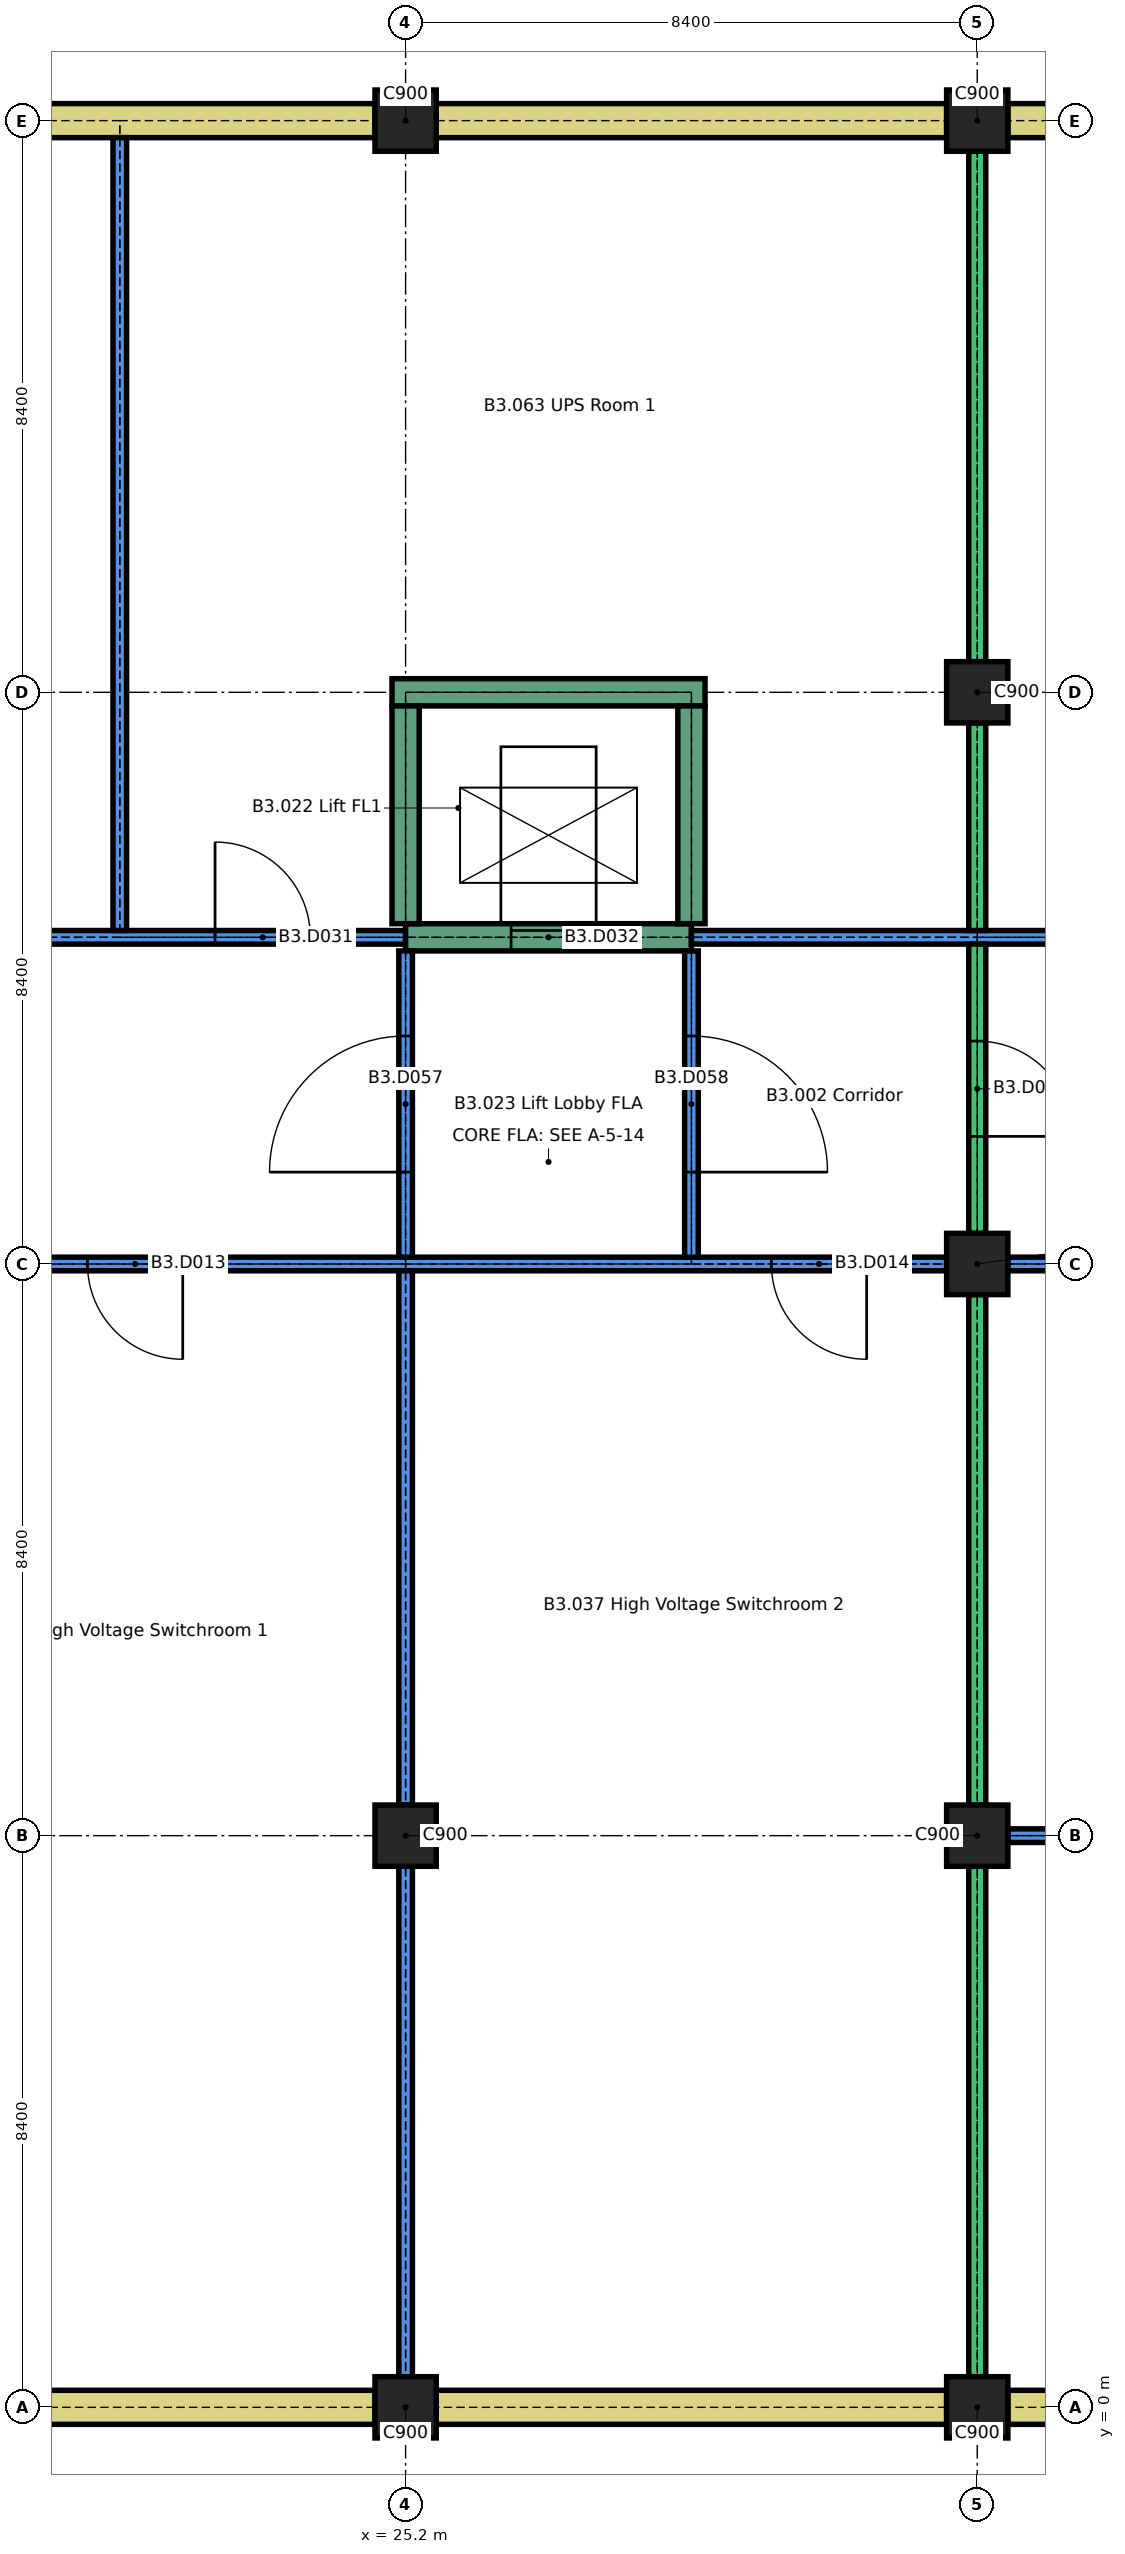
"""IFC4 building model, lengths in metres.
Left out: names, types, materials, properties, quantities, classifications, styles, units other than length and angle.
Written with IfcOpenShell. Run it as: python <this file> out.ifc"""

import sys

from ifc_helpers import new_model, si_unit, direction, frame, frame_2d, origin, origin_2d, place, context, subcontext, project, spatial, rectangle, extrude, element, fill, save


model = new_model("IFC4")
c1 = context("Model", 3, precision=1e-05, world=origin(), true_north=direction((0.0, 1.0)))
c2 = subcontext(c1, "Body", "Model", "MODEL_VIEW")
j1 = project(units=[si_unit("LENGTHUNIT", "METRE"), si_unit("PLANEANGLEUNIT", "RADIAN")], contexts=[c1])
p1 = place(None, origin())
s1 = spatial("IfcSite", under=j1, at=p1, CompositionType="ELEMENT")
p2 = place(p1, origin())
s2 = spatial("IfcBuilding", under=s1, at=p2, CompositionType="ELEMENT")
p3 = place(p2, frame((0.0, 0.0, -11.4)))
s3 = spatial("IfcBuildingStorey", under=s2, at=p3, CompositionType="ELEMENT", Elevation=-11.4)
for number, where, z_axis, x_axis in (
    (1, (25.2, 0.0, 0.0), (0.0, 0.0, 1.0), (1.0, 0.0, 0.0)),
    (2, (33.6, 0.0, 0.0), (0.0, 0.0, 1.0), (1.0, 0.0, 0.0)),
    (3, (25.2, 8.4, 0.0), (0.0, 0.0, 1.0), (1.0, 0.0, 0.0)),
    (4, (33.6, 8.4, 0.0), (0.0, 0.0, 1.0), (1.0, 0.0, 0.0)),
    (5, (33.6, 16.8, 0.0), (0.0, 0.0, 1.0), (1.0, 0.0, 0.0)),
    (6, (33.6, 25.2, 0.0), (0.0, 0.0, 1.0), (1.0, 0.0, 0.0)),
    (7, (25.2, 33.6, 0.0), (0.0, 0.0, 1.0), (1.0, 0.0, 0.0)),
    (8, (33.6, 33.6, 0.0), (0.0, 0.0, 1.0), (1.0, 0.0, 0.0)),
):
    element("IfcColumn", number, at=place(p3, frame(where, z_axis=z_axis, x_axis=x_axis)), inside=s3, PredefinedType="COLUMN", context=c2, shape_type="SweptSolid", body=[
        extrude(rectangle(XDim=0.9, YDim=0.9, at=origin_2d()), origin(), (0.0, 0.0, 1.0), 3.2),
    ])
for number, where, z_axis, x_axis in (
    (9, (17.25, 0.0, 0.0), (0.0, 0.0, 1.0), (1.0, 0.0, 0.0)),
    (10, (25.65, 0.0, 0.0), (0.0, 0.0, 1.0), (1.0, 0.0, 0.0)),
    (11, (34.05, 0.0, 0.0), (0.0, 0.0, 1.0), (1.0, 0.0, 0.0)),
    (12, (17.25, 33.6, 0.0), (0.0, 0.0, 1.0), (1.0, 0.0, 0.0)),
    (13, (25.65, 33.6, 0.0), (0.0, 0.0, 1.0), (1.0, 0.0, 0.0)),
    (14, (34.05, 33.6, 0.0), (0.0, 0.0, 1.0), (1.0, 0.0, 0.0)),
):
    element("IfcWall", number, at=place(p3, frame(where, z_axis=z_axis, x_axis=x_axis)), inside=s3, PredefinedType="SOLIDWALL", context=c2, shape_type="SweptSolid", body=[
        extrude(rectangle(XDim=7.5, YDim=0.5, at=frame_2d((3.75, 0.0))), origin(), (0.0, 0.0, 1.0), 3.2),
    ])
p4 = place(p3, frame((34.05, 8.4, 0.0), z_axis=(0.0, 0.0, 1.0), x_axis=(1.0, 0.0, 0.0)))
e15 = element("IfcWall", 15, at=p4, inside=s3, PredefinedType="PARTITIONING", context=c2, shape_type="SweptSolid", body=[
    extrude(rectangle(XDim=7.5, YDim=0.2, at=frame_2d((3.75, 0.0))), origin(), (0.0, 0.0, 1.0), 3.2),
])
p5 = place(p4, frame((3.05, 0.0, 0.0)))
e16 = element("IfcOpeningElement", 16, at=p5, cuts=e15, PredefinedType="OPENING", context=c2, shape_type="SweptSolid", body=[
    extrude(rectangle(XDim=1.4, YDim=2.1, at=frame_2d((0.7, 1.05))), frame((0.0, 0.11, 0.0), z_axis=(0.0, -1.0, 0.0), x_axis=(1.0, 0.0, 0.0)), (0.0, 0.0, 1.0), 0.22),
])
p6 = place(p3, frame((17.25, 16.8, 0.0), z_axis=(0.0, 0.0, 1.0), x_axis=(1.0, 0.0, 0.0)))
e17 = element("IfcWall", 17, at=p6, inside=s3, PredefinedType="PARTITIONING", context=c2, shape_type="SweptSolid", body=[
    extrude(rectangle(XDim=15.9, YDim=0.2, at=frame_2d((7.95, 0.0))), origin(), (0.0, 0.0, 1.0), 3.2),
])
p7 = place(p6, frame((3.275, 0.0, 0.0)))
e18 = element("IfcOpeningElement", 18, at=p7, cuts=e17, PredefinedType="OPENING", context=c2, shape_type="SweptSolid", body=[
    extrude(rectangle(XDim=1.4, YDim=2.1, at=frame_2d((0.7, 1.05))), frame((0.0, 0.11, 0.0), z_axis=(0.0, -1.0, 0.0), x_axis=(1.0, 0.0, 0.0)), (0.0, 0.0, 1.0), 0.22),
])
p8 = place(p6, frame((13.325, 0.0, 0.0)))
e19 = element("IfcOpeningElement", 19, at=p8, cuts=e17, PredefinedType="OPENING", context=c2, shape_type="SweptSolid", body=[
    extrude(rectangle(XDim=1.4, YDim=2.1, at=frame_2d((0.7, 1.05))), frame((0.0, 0.11, 0.0), z_axis=(0.0, -1.0, 0.0), x_axis=(1.0, 0.0, 0.0)), (0.0, 0.0, 1.0), 0.22),
])
p9 = place(p3, frame((34.05, 16.8, 0.0), z_axis=(0.0, 0.0, 1.0), x_axis=(1.0, 0.0, 0.0)))
e20 = element("IfcWall", 20, at=p9, inside=s3, PredefinedType="PARTITIONING", context=c2, shape_type="SweptSolid", body=[
    extrude(rectangle(XDim=7.5, YDim=0.2, at=frame_2d((3.75, 0.0))), origin(), (0.0, 0.0, 1.0), 3.2),
])
p10 = place(p9, frame((3.05, 0.0, 0.0)))
e21 = element("IfcOpeningElement", 21, at=p10, cuts=e20, PredefinedType="OPENING", context=c2, shape_type="SweptSolid", body=[
    extrude(rectangle(XDim=1.4, YDim=2.1, at=frame_2d((0.7, 1.05))), frame((0.0, 0.11, 0.0), z_axis=(0.0, -1.0, 0.0), x_axis=(1.0, 0.0, 0.0)), (0.0, 0.0, 1.0), 0.22),
])
p11 = place(p3, frame((8.3, 21.6, 0.0), z_axis=(0.0, 0.0, 1.0), x_axis=(1.0, 0.0, 0.0)))
e22 = element("IfcWall", 22, at=p11, inside=s3, PredefinedType="PARTITIONING", context=c2, shape_type="SweptSolid", body=[
    extrude(rectangle(XDim=16.9, YDim=0.2, at=frame_2d((8.45, 0.0))), origin(), (0.0, 0.0, 1.0), 3.2),
])
p12 = place(p11, frame((5.7, 0.0, 0.0)))
e23 = element("IfcOpeningElement", 23, at=p12, cuts=e22, PredefinedType="OPENING", context=c2, shape_type="SweptSolid", body=[
    extrude(rectangle(XDim=1.4, YDim=2.1, at=frame_2d((0.7, 1.05))), frame((0.0, 0.11, 0.0), z_axis=(0.0, -1.0, 0.0), x_axis=(1.0, 0.0, 0.0)), (0.0, 0.0, 1.0), 0.22),
])
p13 = place(p11, frame((14.1, 0.0, 0.0)))
e24 = element("IfcOpeningElement", 24, at=p13, cuts=e22, PredefinedType="OPENING", context=c2, shape_type="SweptSolid", body=[
    extrude(rectangle(XDim=1.4, YDim=2.1, at=frame_2d((0.7, 1.05))), frame((0.0, 0.11, 0.0), z_axis=(0.0, -1.0, 0.0), x_axis=(1.0, 0.0, 0.0)), (0.0, 0.0, 1.0), 0.22),
])
p14 = place(p3, frame((25.2, 21.6, 0.0), z_axis=(0.0, 0.0, 1.0), x_axis=(1.0, 0.0, 0.0)))
e25 = element("IfcWall", 25, at=p14, inside=s3, PredefinedType="SHEAR", context=c2, shape_type="SweptSolid", body=[
    extrude(rectangle(XDim=4.2, YDim=0.4, at=frame_2d((2.1, 0.0))), origin(), (0.0, 0.0, 1.0), 3.2),
])
p15 = place(p14, frame((1.55, 0.0, 0.0)))
e26 = element("IfcOpeningElement", 26, at=p15, cuts=e25, PredefinedType="OPENING", context=c2, shape_type="SweptSolid", body=[
    extrude(rectangle(XDim=1.1, YDim=2.1, at=frame_2d((0.55, 1.05))), frame((0.0, 0.21, 0.0), z_axis=(0.0, -1.0, 0.0), x_axis=(1.0, 0.0, 0.0)), (0.0, 0.0, 1.0), 0.42),
])
p16 = place(p3, frame((29.4, 21.6, 0.0), z_axis=(0.0, 0.0, 1.0), x_axis=(1.0, 0.0, 0.0)))
e27 = element("IfcWall", 27, at=p16, inside=s3, PredefinedType="PARTITIONING", context=c2, shape_type="SweptSolid", body=[
    extrude(rectangle(XDim=21.1, YDim=0.2, at=frame_2d((10.55, 0.0))), origin(), (0.0, 0.0, 1.0), 3.2),
])
p17 = place(p16, frame((11.9, 0.0, 0.0)))
e28 = element("IfcOpeningElement", 28, at=p17, cuts=e27, PredefinedType="OPENING", context=c2, shape_type="SweptSolid", body=[
    extrude(rectangle(XDim=1.4, YDim=2.1, at=frame_2d((0.7, 1.05))), frame((0.0, 0.11, 0.0), z_axis=(0.0, -1.0, 0.0), x_axis=(1.0, 0.0, 0.0)), (0.0, 0.0, 1.0), 0.22),
])
p18 = place(p3, frame((25.0, 25.2, 0.0), z_axis=(0.0, 0.0, 1.0), x_axis=(1.0, 0.0, 0.0)))
e29 = element("IfcWall", 29, at=p18, inside=s3, PredefinedType="SHEAR", context=c2, shape_type="SweptSolid", body=[
    extrude(rectangle(XDim=4.6, YDim=0.4, at=frame_2d((2.3, 0.0))), origin(), (0.0, 0.0, 1.0), 3.2),
])
p19 = place(p3, frame((21.0, 21.7, 0.0), z_axis=(0.0, 0.0, 1.0), x_axis=(0.0, 1.0, 0.0)))
e30 = element("IfcWall", 30, at=p19, inside=s3, PredefinedType="PARTITIONING", context=c2, shape_type="SweptSolid", body=[
    extrude(rectangle(XDim=11.65, YDim=0.2, at=frame_2d((5.825, 0.0))), origin(), (0.0, 0.0, 1.0), 3.2),
])
p20 = place(p3, frame((25.2, 0.45, 0.0), z_axis=(0.0, 0.0, 1.0), x_axis=(0.0, 1.0, 0.0)))
e31 = element("IfcWall", 31, at=p20, inside=s3, PredefinedType="PARTITIONING", context=c2, shape_type="SweptSolid", body=[
    extrude(rectangle(XDim=7.5, YDim=0.2, at=frame_2d((3.75, 0.0))), origin(), (0.0, 0.0, 1.0), 3.2),
])
p21 = place(p3, frame((25.2, 8.85, 0.0), z_axis=(0.0, 0.0, 1.0), x_axis=(0.0, 1.0, 0.0)))
e32 = element("IfcWall", 32, at=p21, inside=s3, PredefinedType="PARTITIONING", context=c2, shape_type="SweptSolid", body=[
    extrude(rectangle(XDim=7.85, YDim=0.2, at=frame_2d((3.925, 0.0))), origin(), (0.0, 0.0, 1.0), 3.2),
])
p22 = place(p3, frame((25.2, 16.9, 0.0), z_axis=(0.0, 0.0, 1.0), x_axis=(0.0, 1.0, 0.0)))
e33 = element("IfcWall", 33, at=p22, inside=s3, PredefinedType="PARTITIONING", context=c2, shape_type="SweptSolid", body=[
    extrude(rectangle(XDim=4.5, YDim=0.2, at=frame_2d((2.25, 0.0))), origin(), (0.0, 0.0, 1.0), 3.2),
])
p23 = place(p22, frame((1.25, 0.0, 0.0)))
e34 = element("IfcOpeningElement", 34, at=p23, cuts=e33, PredefinedType="OPENING", context=c2, shape_type="SweptSolid", body=[
    extrude(rectangle(XDim=2.0, YDim=2.4, at=frame_2d((1.0, 1.2))), frame((0.0, 0.11, 0.0), z_axis=(0.0, -1.0, 0.0), x_axis=(1.0, 0.0, 0.0)), (0.0, 0.0, 1.0), 0.22),
])
p24 = place(p3, frame((25.2, 21.8, 0.0), z_axis=(0.0, 0.0, 1.0), x_axis=(0.0, 1.0, 0.0)))
e35 = element("IfcWall", 35, at=p24, inside=s3, PredefinedType="SHEAR", context=c2, shape_type="SweptSolid", body=[
    extrude(rectangle(XDim=3.2, YDim=0.4, at=frame_2d((1.6, 0.0))), origin(), (0.0, 0.0, 1.0), 3.2),
])
p25 = place(p3, frame((29.4, 16.9, 0.0), z_axis=(0.0, 0.0, 1.0), x_axis=(0.0, 1.0, 0.0)))
e36 = element("IfcWall", 36, at=p25, inside=s3, PredefinedType="PARTITIONING", context=c2, shape_type="SweptSolid", body=[
    extrude(rectangle(XDim=4.5, YDim=0.2, at=frame_2d((2.25, 0.0))), origin(), (0.0, 0.0, 1.0), 3.2),
])
p26 = place(p25, frame((1.25, 0.0, 0.0)))
e37 = element("IfcOpeningElement", 37, at=p26, cuts=e36, PredefinedType="OPENING", context=c2, shape_type="SweptSolid", body=[
    extrude(rectangle(XDim=2.0, YDim=2.4, at=frame_2d((1.0, 1.2))), frame((0.0, 0.11, 0.0), z_axis=(0.0, -1.0, 0.0), x_axis=(1.0, 0.0, 0.0)), (0.0, 0.0, 1.0), 0.22),
])
p27 = place(p3, frame((29.4, 21.8, 0.0), z_axis=(0.0, 0.0, 1.0), x_axis=(0.0, 1.0, 0.0)))
e38 = element("IfcWall", 38, at=p27, inside=s3, PredefinedType="SHEAR", context=c2, shape_type="SweptSolid", body=[
    extrude(rectangle(XDim=3.2, YDim=0.4, at=frame_2d((1.6, 0.0))), origin(), (0.0, 0.0, 1.0), 3.2),
])
for number, where, z_axis, x_axis in (
    (39, (33.6, 0.45, 0.0), (0.0, 0.0, 1.0), (0.0, 1.0, 0.0)),
    (40, (33.6, 8.85, 0.0), (0.0, 0.0, 1.0), (0.0, 1.0, 0.0)),
):
    element("IfcWall", number, at=place(p3, frame(where, z_axis=z_axis, x_axis=x_axis)), inside=s3, PredefinedType="SOLIDWALL", context=c2, shape_type="SweptSolid", body=[
        extrude(rectangle(XDim=7.5, YDim=0.25, at=frame_2d((3.75, 0.0))), origin(), (0.0, 0.0, 1.0), 3.2),
    ])
p28 = place(p3, frame((33.6, 17.25, 0.0), z_axis=(0.0, 0.0, 1.0), x_axis=(0.0, 1.0, 0.0)))
e41 = element("IfcWall", 41, at=p28, inside=s3, PredefinedType="SOLIDWALL", context=c2, shape_type="SweptSolid", body=[
    extrude(rectangle(XDim=4.25, YDim=0.25, at=frame_2d((2.125, 0.0))), origin(), (0.0, 0.0, 1.0), 3.2),
])
p29 = place(p28, frame((1.425, 0.0, 0.0)))
e42 = element("IfcOpeningElement", 42, at=p29, cuts=e41, PredefinedType="OPENING", context=c2, shape_type="SweptSolid", body=[
    extrude(rectangle(XDim=1.4, YDim=2.1, at=frame_2d((0.7, 1.05))), frame((0.0, 0.135, 0.0), z_axis=(0.0, -1.0, 0.0), x_axis=(1.0, 0.0, 0.0)), (0.0, 0.0, 1.0), 0.27),
])
p30 = place(p3, frame((33.6, 21.7, 0.0), z_axis=(0.0, 0.0, 1.0), x_axis=(0.0, 1.0, 0.0)))
e43 = element("IfcWall", 43, at=p30, inside=s3, PredefinedType="SOLIDWALL", context=c2, shape_type="SweptSolid", body=[
    extrude(rectangle(XDim=3.05, YDim=0.25, at=frame_2d((1.525, 0.0))), origin(), (0.0, 0.0, 1.0), 3.2),
])
p31 = place(p3, frame((33.6, 25.65, 0.0), z_axis=(0.0, 0.0, 1.0), x_axis=(0.0, 1.0, 0.0)))
e44 = element("IfcWall", 44, at=p31, inside=s3, PredefinedType="SOLIDWALL", context=c2, shape_type="SweptSolid", body=[
    extrude(rectangle(XDim=7.5, YDim=0.25, at=frame_2d((3.75, 0.0))), origin(), (0.0, 0.0, 1.0), 3.2),
])
p32 = place(p7, origin())
e45 = element("IfcDoor", 45, at=p32, inside=s3, OperationType="SINGLE_SWING_RIGHT", PredefinedType="DOOR", context=c2, shape_type="SweptSolid", body=[
    extrude(rectangle(XDim=1.4, YDim=2.1, at=frame_2d((0.7, 1.05))), frame((0.0, 0.025, 0.0), z_axis=(0.0, -1.0, 0.0), x_axis=(1.0, 0.0, 0.0)), (0.0, 0.0, 1.0), 0.05),
])
fill(e18, e45)
p33 = place(p8, origin())
e46 = element("IfcDoor", 46, at=p33, inside=s3, OperationType="SINGLE_SWING_RIGHT", PredefinedType="DOOR", context=c2, shape_type="SweptSolid", body=[
    extrude(rectangle(XDim=1.4, YDim=2.1, at=frame_2d((0.7, 1.05))), frame((0.0, 0.025, 0.0), z_axis=(0.0, -1.0, 0.0), x_axis=(1.0, 0.0, 0.0)), (0.0, 0.0, 1.0), 0.05),
])
fill(e19, e46)
p34 = place(p13, origin())
e47 = element("IfcDoor", 47, at=p34, inside=s3, OperationType="SINGLE_SWING_RIGHT", PredefinedType="DOOR", context=c2, shape_type="SweptSolid", body=[
    extrude(rectangle(XDim=1.4, YDim=2.1, at=frame_2d((0.7, 1.05))), frame((0.0, 0.025, 0.0), z_axis=(0.0, -1.0, 0.0), x_axis=(1.0, 0.0, 0.0)), (0.0, 0.0, 1.0), 0.05),
])
fill(e24, e47)
p35 = place(p15, origin())
e48 = element("IfcDoor", 48, at=p35, inside=s3, OperationType="SLIDING_TO_LEFT", PredefinedType="DOOR", context=c2, shape_type="SweptSolid", body=[
    extrude(rectangle(XDim=1.1, YDim=2.1, at=frame_2d((0.55, 1.05))), frame((0.0, 0.025, 0.0), z_axis=(0.0, -1.0, 0.0), x_axis=(1.0, 0.0, 0.0)), (0.0, 0.0, 1.0), 0.05),
])
fill(e26, e48)
p36 = place(p23, origin())
e49 = element("IfcDoor", 49, at=p36, inside=s3, OperationType="SINGLE_SWING_RIGHT", PredefinedType="DOOR", context=c2, shape_type="SweptSolid", body=[
    extrude(rectangle(XDim=2.0, YDim=2.4, at=frame_2d((1.0, 1.2))), frame((0.0, 0.03, 0.0), z_axis=(0.0, -1.0, 0.0), x_axis=(1.0, 0.0, 0.0)), (0.0, 0.0, 1.0), 0.06),
])
fill(e34, e49)
p37 = place(p26, origin())
e50 = element("IfcDoor", 50, at=p37, inside=s3, OperationType="SINGLE_SWING_LEFT", PredefinedType="DOOR", context=c2, shape_type="SweptSolid", body=[
    extrude(rectangle(XDim=2.0, YDim=2.4, at=frame_2d((1.0, 1.2))), frame((0.0, 0.03, 0.0), z_axis=(0.0, -1.0, 0.0), x_axis=(1.0, 0.0, 0.0)), (0.0, 0.0, 1.0), 0.06),
])
fill(e37, e50)
p38 = place(p29, origin())
e51 = element("IfcDoor", 51, at=p38, inside=s3, OperationType="SINGLE_SWING_LEFT", PredefinedType="DOOR", context=c2, shape_type="SweptSolid", body=[
    extrude(rectangle(XDim=1.4, YDim=2.1, at=frame_2d((0.7, 1.05))), frame((0.0, 0.03, 0.0), z_axis=(0.0, -1.0, 0.0), x_axis=(1.0, 0.0, 0.0)), (0.0, 0.0, 1.0), 0.06),
])
fill(e42, e51)
save(model, sys.argv[1])
